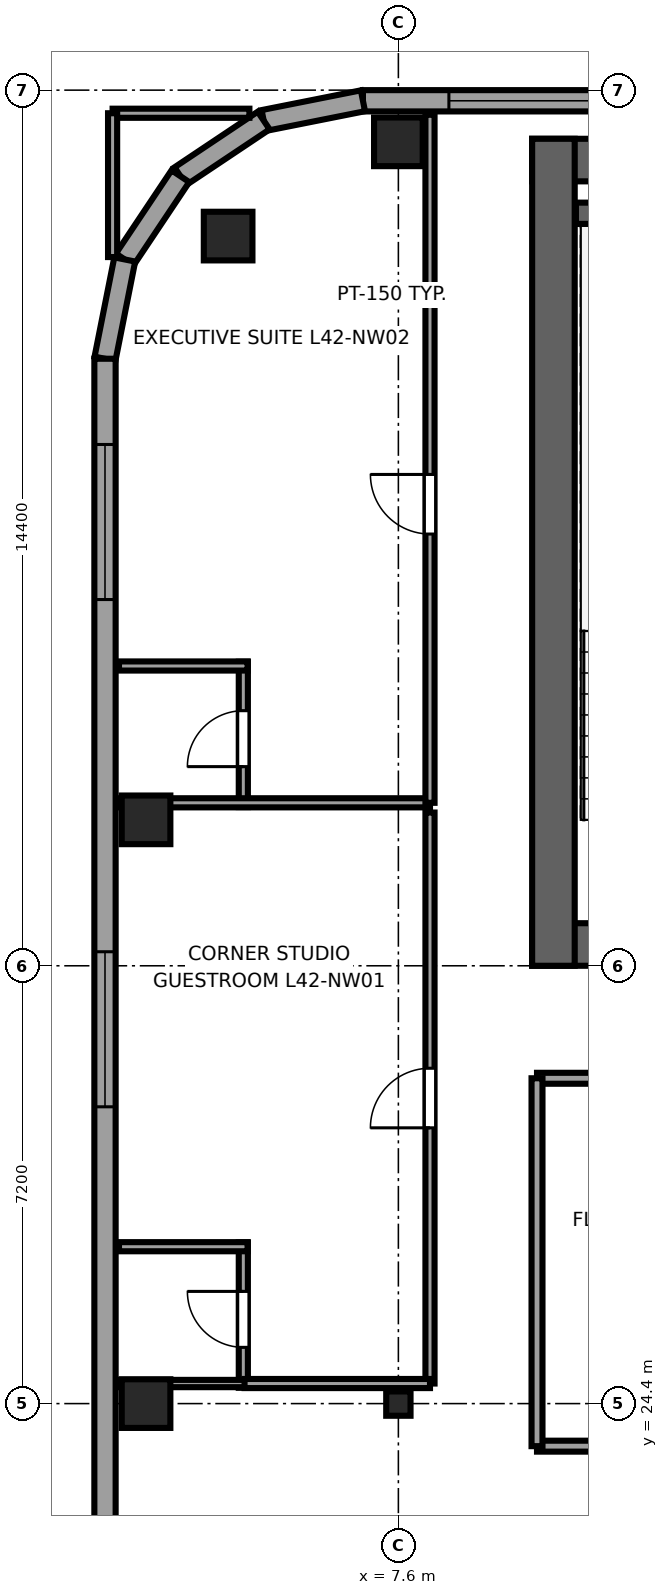
"""IFC4 building model, lengths in metres.
Left out: names, types, materials, properties, quantities, classifications, styles, units other than length and angle.
Written with IfcOpenShell. Run it as: python <this file> out.ifc"""

import sys

from ifc_helpers import new_model, si_unit, direction, frame, frame_2d, origin, origin_2d, place, context, subcontext, project, spatial, rectangle, i_section, extrude, source, transform, mapped, element, fill, save


model = new_model("IFC4")
c1 = context("Model", 3, precision=1e-05, world=origin(), true_north=direction((0.0, 1.0)))
c2 = subcontext(c1, "Body", "Model", "MODEL_VIEW")
j1 = project(units=[si_unit("LENGTHUNIT", "METRE"), si_unit("PLANEANGLEUNIT", "RADIAN")], contexts=[c1])
p1 = place(None, origin())
s1 = spatial("IfcSite", under=j1, at=p1, CompositionType="ELEMENT")
p2 = place(p1, origin())
s2 = spatial("IfcBuilding", under=s1, at=p2, CompositionType="ELEMENT")
p3 = place(p2, frame((0.0, 0.0, 161.25)))
s3 = spatial("IfcBuildingStorey", under=s2, at=p3, CompositionType="ELEMENT", Elevation=161.25)
p4 = place(p3, frame((9.8, 31.95, 0.0), z_axis=(0.0, 0.0, 1.0), x_axis=(1.0, 0.0, 0.0)))
e1 = element("IfcWall", 1, at=p4, inside=s3, PredefinedType="SHEAR", context=c2, shape_type="SweptSolid", body=[
    extrude(rectangle(XDim=26.4, YDim=0.7, at=frame_2d((13.2, 0.0))), origin(), (0.0, 0.0, 1.0), 3.55),
])
p5 = place(p4, frame((7.65, 0.0, 0.0), z_axis=(0.0, 0.0, 1.0), x_axis=(-1.0, 0.0, 0.0)))
e2 = element("IfcOpeningElement", 2, at=p5, cuts=e1, PredefinedType="OPENING", context=c2, shape_type="SweptSolid", body=[
    extrude(rectangle(XDim=1.5, YDim=2.04, at=frame_2d((0.75, 1.02))), frame((0.0, 0.36, 0.0), z_axis=(0.0, -1.0, 0.0), x_axis=(1.0, 0.0, 0.0)), (0.0, 0.0, 1.0), 0.72),
])
p6 = place(p4, frame((13.95, 0.0, 0.0), z_axis=(0.0, 0.0, 1.0), x_axis=(-1.0, 0.0, 0.0)))
e3 = element("IfcOpeningElement", 3, at=p6, cuts=e1, PredefinedType="OPENING", context=c2, shape_type="SweptSolid", body=[
    extrude(rectangle(XDim=1.5, YDim=2.04, at=frame_2d((0.75, 1.02))), frame((0.0, 0.36, 0.0), z_axis=(0.0, -1.0, 0.0), x_axis=(1.0, 0.0, 0.0)), (0.0, 0.0, 1.0), 0.72),
])
p7 = place(p4, frame((20.25, 0.0, 0.0), z_axis=(0.0, 0.0, 1.0), x_axis=(-1.0, 0.0, 0.0)))
e4 = element("IfcOpeningElement", 4, at=p7, cuts=e1, PredefinedType="OPENING", context=c2, shape_type="SweptSolid", body=[
    extrude(rectangle(XDim=1.5, YDim=2.04, at=frame_2d((0.75, 1.02))), frame((0.0, 0.36, 0.0), z_axis=(0.0, -1.0, 0.0), x_axis=(1.0, 0.0, 0.0)), (0.0, 0.0, 1.0), 0.72),
])
p8 = place(p3, frame((9.8, 44.85, 0.0), z_axis=(0.0, 0.0, 1.0), x_axis=(1.0, 0.0, 0.0)))
e5 = element("IfcWall", 5, at=p8, inside=s3, PredefinedType="SHEAR", context=c2, shape_type="SweptSolid", body=[
    extrude(rectangle(XDim=26.4, YDim=0.7, at=frame_2d((13.2, 0.0))), origin(), (0.0, 0.0, 1.0), 3.55),
])
p9 = place(p3, frame((10.15, 31.6, 0.0), z_axis=(0.0, 0.0, 1.0), x_axis=(0.0, 1.0, 0.0)))
e6 = element("IfcWall", 6, at=p9, inside=s3, PredefinedType="SHEAR", context=c2, shape_type="SweptSolid", body=[
    extrude(rectangle(XDim=13.6, YDim=0.7, at=frame_2d((6.8, 0.0))), origin(), (0.0, 0.0, 1.0), 3.55),
])
p10 = place(p3, frame((10.52, 43.975, 0.0), z_axis=(0.0, 0.0, 1.0), x_axis=(1.0, 0.0, 0.0)))
e7 = element("IfcWall", 7, at=p10, inside=s3, PredefinedType="SHEAR", context=c2, shape_type="SweptSolid", body=[
    extrude(rectangle(XDim=3.6, YDim=0.35, at=frame_2d((1.8, 0.0))), origin(), (0.0, 0.0, 1.0), 3.55),
])
m1 = source(origin(), c2, "Body", "SweptSolid", [
    extrude(rectangle(XDim=0.8, YDim=0.8, at=origin_2d()), origin(), (0.0, 0.0, 1.0), 3.55),
])
p11 = place(p3, frame((3.45, 24.4, 0.0), z_axis=(0.0, 0.0, 1.0), x_axis=(1.0, 0.0, 0.0)))
e8 = element("IfcColumn", 8, at=p11, inside=s3, PredefinedType="COLUMN", context=c2, shape_type="MappedRepresentation", body=[
    mapped(m1, transform((0.0, 0.0, 0.0), x_axis=(1.0, 0.0, 0.0), y_axis=(0.0, 1.0, 0.0), z_axis=(0.0, 0.0, 1.0), scale=1.0)),
])
m2 = source(origin(), c2, "Body", "SweptSolid", [
    extrude(i_section(OverallWidth=0.4, OverallDepth=0.4, WebThickness=0.02, FlangeThickness=0.035, at=origin_2d()), origin(), (0.0, 0.0, 1.0), 3.55),
])
p12 = place(p3, frame((7.6, 24.4, 0.0), z_axis=(0.0, 0.0, 1.0), x_axis=(1.0, 0.0, 0.0)))
e9 = element("IfcColumn", 9, at=p12, inside=s3, PredefinedType="COLUMN", context=c2, shape_type="MappedRepresentation", body=[
    mapped(m2, transform((0.0, 0.0, 0.0), x_axis=(1.0, 0.0, 0.0), y_axis=(0.0, 1.0, 0.0), z_axis=(0.0, 0.0, 1.0), scale=1.0)),
])
for number, where, z_axis, x_axis in (
    (10, (4.8, 43.6, 0.0), (0.0, 0.0, 1.0), (1.0, 0.0, 0.0)),
    (11, (7.6, 45.15, 0.0), (0.0, 0.0, 1.0), (1.0, 0.0, 0.0)),
    (12, (3.45, 34.0, 0.0), (0.0, 0.0, 1.0), (1.0, 0.0, 0.0)),
):
    element("IfcColumn", number, at=place(p3, frame(where, z_axis=z_axis, x_axis=x_axis)), inside=s3, PredefinedType="COLUMN", context=c2, shape_type="MappedRepresentation", body=[
        mapped(m1, transform((0.0, 0.0, 0.0), x_axis=(1.0, 0.0, 0.0), y_axis=(0.0, 1.0, 0.0), z_axis=(0.0, 0.0, 1.0), scale=1.0)),
    ])
p13 = place(p3, frame((49.983, 45.825, 0.0), z_axis=(0.0, 0.0, 1.0), x_axis=(-1.0, 0.0, 0.0)))
e13 = element("IfcWall", 13, at=p13, inside=s3, PredefinedType="SOLIDWALL", context=c2, shape_type="SweptSolid", body=[
    extrude(rectangle(XDim=42.966, YDim=0.35, at=frame_2d((21.483, 0.0))), origin(), (0.0, 0.0, 1.0), 3.37),
])
p14 = place(p13, frame((1.413, 0.0, 0.68)))
e14 = element("IfcOpeningElement", 14, at=p14, cuts=e13, PredefinedType="OPENING", context=c2, shape_type="SweptSolid", body=[
    extrude(rectangle(XDim=2.55, YDim=1.92, at=frame_2d((1.275, 0.96))), frame((0.0, 0.185, 0.0), z_axis=(0.0, -1.0, 0.0), x_axis=(1.0, 0.0, 0.0)), (0.0, 0.0, 1.0), 0.37),
])
p15 = place(p13, frame((9.766, 0.0, 0.68)))
e15 = element("IfcOpeningElement", 15, at=p15, cuts=e13, PredefinedType="OPENING", context=c2, shape_type="SweptSolid", body=[
    extrude(rectangle(XDim=2.55, YDim=1.92, at=frame_2d((1.275, 0.96))), frame((0.0, 0.185, 0.0), z_axis=(0.0, -1.0, 0.0), x_axis=(1.0, 0.0, 0.0)), (0.0, 0.0, 1.0), 0.37),
])
p16 = place(p13, frame((13.943, 0.0, 0.68)))
e16 = element("IfcOpeningElement", 16, at=p16, cuts=e13, PredefinedType="OPENING", context=c2, shape_type="SweptSolid", body=[
    extrude(rectangle(XDim=2.55, YDim=1.92, at=frame_2d((1.275, 0.96))), frame((0.0, 0.185, 0.0), z_axis=(0.0, -1.0, 0.0), x_axis=(1.0, 0.0, 0.0)), (0.0, 0.0, 1.0), 0.37),
])
p17 = place(p13, frame((18.12, 0.0, 0.68)))
e17 = element("IfcOpeningElement", 17, at=p17, cuts=e13, PredefinedType="OPENING", context=c2, shape_type="SweptSolid", body=[
    extrude(rectangle(XDim=2.55, YDim=1.92, at=frame_2d((1.275, 0.96))), frame((0.0, 0.185, 0.0), z_axis=(0.0, -1.0, 0.0), x_axis=(1.0, 0.0, 0.0)), (0.0, 0.0, 1.0), 0.37),
])
p18 = place(p13, frame((22.296, 0.0, 0.68)))
e18 = element("IfcOpeningElement", 18, at=p18, cuts=e13, PredefinedType="OPENING", context=c2, shape_type="SweptSolid", body=[
    extrude(rectangle(XDim=2.55, YDim=1.92, at=frame_2d((1.275, 0.96))), frame((0.0, 0.185, 0.0), z_axis=(0.0, -1.0, 0.0), x_axis=(1.0, 0.0, 0.0)), (0.0, 0.0, 1.0), 0.37),
])
p19 = place(p13, frame((26.473, 0.0, 0.68)))
e19 = element("IfcOpeningElement", 19, at=p19, cuts=e13, PredefinedType="OPENING", context=c2, shape_type="SweptSolid", body=[
    extrude(rectangle(XDim=2.55, YDim=1.92, at=frame_2d((1.275, 0.96))), frame((0.0, 0.185, 0.0), z_axis=(0.0, -1.0, 0.0), x_axis=(1.0, 0.0, 0.0)), (0.0, 0.0, 1.0), 0.37),
])
p20 = place(p13, frame((30.649, 0.0, 0.68)))
e20 = element("IfcOpeningElement", 20, at=p20, cuts=e13, PredefinedType="OPENING", context=c2, shape_type="SweptSolid", body=[
    extrude(rectangle(XDim=2.55, YDim=1.92, at=frame_2d((1.275, 0.96))), frame((0.0, 0.185, 0.0), z_axis=(0.0, -1.0, 0.0), x_axis=(1.0, 0.0, 0.0)), (0.0, 0.0, 1.0), 0.37),
])
p21 = place(p13, frame((34.826, 0.0, 0.68)))
e21 = element("IfcOpeningElement", 21, at=p21, cuts=e13, PredefinedType="OPENING", context=c2, shape_type="SweptSolid", body=[
    extrude(rectangle(XDim=2.55, YDim=1.92, at=frame_2d((1.275, 0.96))), frame((0.0, 0.185, 0.0), z_axis=(0.0, -1.0, 0.0), x_axis=(1.0, 0.0, 0.0)), (0.0, 0.0, 1.0), 0.37),
])
p22 = place(p13, frame((39.002, 0.0, 0.68)))
e22 = element("IfcOpeningElement", 22, at=p22, cuts=e13, PredefinedType="OPENING", context=c2, shape_type="SweptSolid", body=[
    extrude(rectangle(XDim=2.55, YDim=1.92, at=frame_2d((1.275, 0.96))), frame((0.0, 0.185, 0.0), z_axis=(0.0, -1.0, 0.0), x_axis=(1.0, 0.0, 0.0)), (0.0, 0.0, 1.0), 0.37),
])
p23 = place(p3, frame((7.017, 45.825, 0.0), z_axis=(0.0, 0.0, 1.0), x_axis=(-0.980788844421, -0.195072403631, 0.0)))
e23 = element("IfcWall", 23, at=p23, inside=s3, PredefinedType="SOLIDWALL", context=c2, shape_type="SweptSolid", body=[
    extrude(rectangle(XDim=1.665, YDim=0.35, at=frame_2d((0.832, 0.0))), origin(), (0.0, 0.0, 1.0), 3.37),
])
for number, where, z_axis, x_axis in (
    (24, (5.385, 45.5, 0.0), (0.0, 0.0, 1.0), (-0.832, -0.556, 0.0)),
    (25, (4.015, 44.585, 0.0), (0.0, 0.0, 1.0), (-0.556, -0.831, 0.0)),
):
    element("IfcWall", number, at=place(p3, frame(where, z_axis=z_axis, x_axis=x_axis)), inside=s3, PredefinedType="SOLIDWALL", context=c2, shape_type="SweptSolid", body=[
        extrude(rectangle(XDim=1.647, YDim=0.35, at=frame_2d((0.824, 0.0))), origin(), (0.0, 0.0, 1.0), 2.832),
    ])
p24 = place(p3, frame((3.1, 43.216, 0.0), z_axis=(0.0, 0.0, 1.0), x_axis=(-0.195044345786, -0.980794424524, 0.0)))
e26 = element("IfcWall", 26, at=p24, inside=s3, PredefinedType="SOLIDWALL", context=c2, shape_type="SweptSolid", body=[
    extrude(rectangle(XDim=1.665, YDim=0.35, at=frame_2d((0.833, 0.0))), origin(), (0.0, 0.0, 1.0), 3.37),
])
p25 = place(p3, frame((2.775, 41.583, 0.0), z_axis=(0.0, 0.0, 1.0), x_axis=(0.0, -1.0, 0.0)))
e27 = element("IfcWall", 27, at=p25, inside=s3, PredefinedType="SOLIDWALL", context=c2, shape_type="SweptSolid", body=[
    extrude(rectangle(XDim=34.566, YDim=0.35, at=frame_2d((17.283, 0.0))), origin(), (0.0, 0.0, 1.0), 3.37),
])
p26 = place(p25, frame((1.41, 0.0, 0.68)))
e28 = element("IfcOpeningElement", 28, at=p26, cuts=e27, PredefinedType="OPENING", context=c2, shape_type="SweptSolid", body=[
    extrude(rectangle(XDim=2.55, YDim=1.92, at=frame_2d((1.275, 0.96))), frame((0.0, 0.185, 0.0), z_axis=(0.0, -1.0, 0.0), x_axis=(1.0, 0.0, 0.0)), (0.0, 0.0, 1.0), 0.37),
])
p27 = place(p25, frame((9.752, 0.0, 0.68)))
e29 = element("IfcOpeningElement", 29, at=p27, cuts=e27, PredefinedType="OPENING", context=c2, shape_type="SweptSolid", body=[
    extrude(rectangle(XDim=2.55, YDim=1.92, at=frame_2d((1.275, 0.96))), frame((0.0, 0.185, 0.0), z_axis=(0.0, -1.0, 0.0), x_axis=(1.0, 0.0, 0.0)), (0.0, 0.0, 1.0), 0.37),
])
p28 = place(p25, frame((32.079, 0.0, 0.62)))
e30 = element("IfcOpeningElement", 30, at=p28, cuts=e27, PredefinedType="OPENING", context=c2, shape_type="SweptSolid", body=[
    extrude(rectangle(XDim=1.5, YDim=1.55, at=frame_2d((0.75, 0.775))), frame((0.0, 0.185, 0.0), z_axis=(0.0, -1.0, 0.0), x_axis=(1.0, 0.0, 0.0)), (0.0, 0.0, 1.0), 0.37),
])
p29 = place(p25, frame((28.583, 0.0, 0.62)))
e31 = element("IfcOpeningElement", 31, at=p29, cuts=e27, PredefinedType="OPENING", context=c2, shape_type="SweptSolid", body=[
    extrude(rectangle(XDim=1.5, YDim=1.55, at=frame_2d((0.75, 0.775))), frame((0.0, 0.185, 0.0), z_axis=(0.0, -1.0, 0.0), x_axis=(1.0, 0.0, 0.0)), (0.0, 0.0, 1.0), 0.37),
])
p30 = place(p25, frame((24.883, 0.0, 0.62)))
e32 = element("IfcOpeningElement", 32, at=p30, cuts=e27, PredefinedType="OPENING", context=c2, shape_type="SweptSolid", body=[
    extrude(rectangle(XDim=1.5, YDim=1.55, at=frame_2d((0.75, 0.775))), frame((0.0, 0.185, 0.0), z_axis=(0.0, -1.0, 0.0), x_axis=(1.0, 0.0, 0.0)), (0.0, 0.0, 1.0), 0.37),
])
p31 = place(p25, frame((21.183, 0.0, 0.62)))
e33 = element("IfcOpeningElement", 33, at=p31, cuts=e27, PredefinedType="OPENING", context=c2, shape_type="SweptSolid", body=[
    extrude(rectangle(XDim=1.5, YDim=1.55, at=frame_2d((0.75, 0.775))), frame((0.0, 0.185, 0.0), z_axis=(0.0, -1.0, 0.0), x_axis=(1.0, 0.0, 0.0)), (0.0, 0.0, 1.0), 0.37),
])
p32 = place(p3, frame((5.05, 24.66, 0.0), z_axis=(0.0, 0.0, 1.0), x_axis=(0.0, 1.0, 0.0)))
e34 = element("IfcWall", 34, at=p32, inside=s3, PredefinedType="PARTITIONING", context=c2, shape_type="SweptSolid", body=[
    extrude(rectangle(XDim=2.39, YDim=0.15, at=frame_2d((1.195, 0.0))), origin(), (0.0, 0.0, 1.0), 3.37),
])
p33 = place(p32, frame((0.665, 0.0, 0.0)))
e35 = element("IfcOpeningElement", 35, at=p33, cuts=e34, PredefinedType="OPENING", context=c2, shape_type="SweptSolid", body=[
    extrude(rectangle(XDim=0.92, YDim=2.01, at=frame_2d((0.46, 1.005))), frame((0.0, 0.085, 0.0), z_axis=(0.0, -1.0, 0.0), x_axis=(1.0, 0.0, 0.0)), (0.0, 0.0, 1.0), 0.17),
])
p34 = place(p3, frame((3.005, 24.73, 0.0), z_axis=(0.0, 0.0, 1.0), x_axis=(1.0, 0.0, 0.0)))
e36 = element("IfcWall", 36, at=p34, inside=s3, PredefinedType="PLUMBINGWALL", context=c2, shape_type="SweptSolid", body=[
    extrude(rectangle(XDim=2.115, YDim=0.12, at=frame_2d((1.058, 0.0))), origin(), (0.0, 0.0, 1.0), 3.37),
])
p35 = place(p3, frame((3.005, 26.98, 0.0), z_axis=(0.0, 0.0, 1.0), x_axis=(1.0, 0.0, 0.0)))
e37 = element("IfcWall", 37, at=p35, inside=s3, PredefinedType="PARTITIONING", context=c2, shape_type="SweptSolid", body=[
    extrude(rectangle(XDim=2.115, YDim=0.15, at=frame_2d((1.058, 0.0))), origin(), (0.0, 0.0, 1.0), 3.37),
])
p36 = place(p3, frame((5.05, 34.21, 0.0), z_axis=(0.0, 0.0, 1.0), x_axis=(0.0, 1.0, 0.0)))
e38 = element("IfcWall", 38, at=p36, inside=s3, PredefinedType="PARTITIONING", context=c2, shape_type="SweptSolid", body=[
    extrude(rectangle(XDim=2.39, YDim=0.15, at=frame_2d((1.195, 0.0))), origin(), (0.0, 0.0, 1.0), 3.37),
])
p37 = place(p36, frame((0.665, 0.0, 0.0)))
e39 = element("IfcOpeningElement", 39, at=p37, cuts=e38, PredefinedType="OPENING", context=c2, shape_type="SweptSolid", body=[
    extrude(rectangle(XDim=0.92, YDim=2.01, at=frame_2d((0.46, 1.005))), frame((0.0, 0.085, 0.0), z_axis=(0.0, -1.0, 0.0), x_axis=(1.0, 0.0, 0.0)), (0.0, 0.0, 1.0), 0.17),
])
p38 = place(p3, frame((3.005, 34.28, 0.0), z_axis=(0.0, 0.0, 1.0), x_axis=(1.0, 0.0, 0.0)))
e40 = element("IfcWall", 40, at=p38, inside=s3, PredefinedType="PARTITIONING", context=c2, shape_type="SweptSolid", body=[
    extrude(rectangle(XDim=5.115, YDim=0.15, at=frame_2d((2.558, 0.0))), origin(), (0.0, 0.0, 1.0), 2.16),
])
p39 = place(p3, frame((3.005, 36.53, 0.0), z_axis=(0.0, 0.0, 1.0), x_axis=(1.0, 0.0, 0.0)))
e41 = element("IfcWall", 41, at=p39, inside=s3, PredefinedType="PARTITIONING", context=c2, shape_type="SweptSolid", body=[
    extrude(rectangle(XDim=2.115, YDim=0.15, at=frame_2d((1.058, 0.0))), origin(), (0.0, 0.0, 1.0), 3.37),
])
p40 = place(p3, frame((8.12, 24.73, 0.0), z_axis=(0.0, 0.0, 1.0), x_axis=(0.0, 1.0, 0.0)))
e42 = element("IfcWall", 42, at=p40, inside=s3, PredefinedType="PARTITIONING", context=c2, shape_type="SweptSolid", body=[
    extrude(rectangle(XDim=9.39, YDim=0.15, at=frame_2d((4.695, 0.0))), origin(), (0.0, 0.0, 1.0), 3.37),
])
p41 = place(p40, frame((4.205, 0.0, 0.0)))
e43 = element("IfcOpeningElement", 43, at=p41, cuts=e42, PredefinedType="OPENING", context=c2, shape_type="SweptSolid", body=[
    extrude(rectangle(XDim=0.98, YDim=2.12, at=frame_2d((0.49, 1.06))), frame((0.0, 0.085, 0.0), z_axis=(0.0, -1.0, 0.0), x_axis=(1.0, 0.0, 0.0)), (0.0, 0.0, 1.0), 0.17),
])
p42 = place(p3, frame((5.07, 24.73, 0.0), z_axis=(0.0, 0.0, 1.0), x_axis=(1.0, 0.0, 0.0)))
e44 = element("IfcWall", 44, at=p42, inside=s3, PredefinedType="PARTITIONING", context=c2, shape_type="SweptSolid", body=[
    extrude(rectangle(XDim=3.05, YDim=0.15, at=frame_2d((1.525, 0.0))), origin(), (0.0, 0.0, 1.0), 3.37),
])
p43 = place(p3, frame((8.12, 34.28, 0.0), z_axis=(0.0, 0.0, 1.0), x_axis=(0.0, 1.0, 0.0)))
e45 = element("IfcWall", 45, at=p43, inside=s3, PredefinedType="PARTITIONING", context=c2, shape_type="SweptSolid", body=[
    extrude(rectangle(XDim=11.315, YDim=0.15, at=frame_2d((5.657, 0.0))), origin(), (0.0, 0.0, 1.0), 3.37),
])
p44 = place(p43, frame((4.42, 0.0, 0.0)))
e46 = element("IfcOpeningElement", 46, at=p44, cuts=e45, PredefinedType="OPENING", context=c2, shape_type="SweptSolid", body=[
    extrude(rectangle(XDim=0.98, YDim=2.12, at=frame_2d((0.49, 1.06))), frame((0.0, 0.085, 0.0), z_axis=(0.0, -1.0, 0.0), x_axis=(1.0, 0.0, 0.0)), (0.0, 0.0, 1.0), 0.17),
])
p45 = place(p3, frame((2.9, 45.62, 0.0), z_axis=(0.0, 0.0, 1.0), x_axis=(1.0, 0.0, 0.0)))
e47 = element("IfcWall", 47, at=p45, inside=s3, PredefinedType="PARTITIONING", context=c2, shape_type="SweptSolid", body=[
    extrude(rectangle(XDim=2.25, YDim=0.15, at=frame_2d((1.125, 0.0))), origin(), (0.0, 0.0, 1.0), 3.37),
])
p46 = place(p3, frame((2.9, 43.255, 0.0), z_axis=(0.0, 0.0, 1.0), x_axis=(0.0, 1.0, 0.0)))
e48 = element("IfcWall", 48, at=p46, inside=s3, PredefinedType="PARTITIONING", context=c2, shape_type="SweptSolid", body=[
    extrude(rectangle(XDim=2.365, YDim=0.15, at=frame_2d((1.183, 0.0))), origin(), (0.0, 0.0, 1.0), 3.37),
])
p47 = place(p3, frame((9.88, 23.7, 0.0), z_axis=(0.0, 0.0, 1.0), x_axis=(1.0, 0.0, 0.0)))
e49 = element("IfcWall", 49, at=p47, inside=s3, PredefinedType="PARTITIONING", context=c2, shape_type="SweptSolid", body=[
    extrude(rectangle(XDim=4.22, YDim=0.18, at=frame_2d((2.11, 0.0))), origin(), (0.0, 0.0, 1.0), 3.37),
])
p48 = place(p47, frame((1.285, 0.0, 0.0)))
e50 = element("IfcOpeningElement", 50, at=p48, cuts=e49, PredefinedType="OPENING", context=c2, shape_type="SweptSolid", body=[
    extrude(rectangle(XDim=1.65, YDim=2.15, at=frame_2d((0.825, 1.075))), frame((0.0, 0.1, 0.0), z_axis=(0.0, -1.0, 0.0), x_axis=(1.0, 0.0, 0.0)), (0.0, 0.0, 1.0), 0.2),
])
p49 = place(p3, frame((9.88, 29.75, 0.0), z_axis=(0.0, 0.0, 1.0), x_axis=(1.0, 0.0, 0.0)))
e51 = element("IfcWall", 51, at=p49, inside=s3, PredefinedType="PARTITIONING", context=c2, shape_type="SweptSolid", body=[
    extrude(rectangle(XDim=4.22, YDim=0.18, at=frame_2d((2.11, 0.0))), origin(), (0.0, 0.0, 1.0), 3.37),
])
p50 = place(p3, frame((9.88, 23.7, 0.0), z_axis=(0.0, 0.0, 1.0), x_axis=(0.0, 1.0, 0.0)))
e52 = element("IfcWall", 52, at=p50, inside=s3, PredefinedType="PARTITIONING", context=c2, shape_type="SweptSolid", body=[
    extrude(rectangle(XDim=6.05, YDim=0.18, at=frame_2d((3.025, 0.0))), origin(), (0.0, 0.0, 1.0), 3.37),
])
m3 = source(origin(), c2, "Body", "SweptSolid", [
    extrude(rectangle(XDim=2.55, YDim=1.92, at=frame_2d((1.275, 0.96))), frame((0.0, 0.09, 0.0), z_axis=(0.0, -1.0, 0.0), x_axis=(1.0, 0.0, 0.0)), (0.0, 0.0, 1.0), 0.06),
])
p51 = place(p22, origin())
e53 = element("IfcWindow", 53, at=p51, inside=s3, PartitioningType="TRIPLE_PANEL_HORIZONTAL", PredefinedType="WINDOW", context=c2, shape_type="MappedRepresentation", body=[
    mapped(m3, transform((0.0, 0.0, 0.0), x_axis=(1.0, 0.0, 0.0), y_axis=(0.0, 1.0, 0.0), z_axis=(0.0, 0.0, 1.0), scale=1.0)),
])
fill(e22, e53)
p52 = place(p26, origin())
e54 = element("IfcWindow", 54, at=p52, inside=s3, PartitioningType="TRIPLE_PANEL_HORIZONTAL", PredefinedType="WINDOW", context=c2, shape_type="MappedRepresentation", body=[
    mapped(m3, transform((0.0, 0.0, 0.0), x_axis=(1.0, 0.0, 0.0), y_axis=(0.0, 1.0, 0.0), z_axis=(0.0, 0.0, 1.0), scale=1.0)),
])
fill(e28, e54)
p53 = place(p27, origin())
e55 = element("IfcWindow", 55, at=p53, inside=s3, PartitioningType="TRIPLE_PANEL_HORIZONTAL", PredefinedType="WINDOW", context=c2, shape_type="MappedRepresentation", body=[
    mapped(m3, transform((0.0, 0.0, 0.0), x_axis=(1.0, 0.0, 0.0), y_axis=(0.0, 1.0, 0.0), z_axis=(0.0, 0.0, 1.0), scale=1.0)),
])
fill(e29, e55)
m4 = source(origin(), c2, "Body", "SweptSolid", [
    extrude(rectangle(XDim=0.92, YDim=2.01, at=frame_2d((0.46, 1.005))), frame((0.0, 0.025, 0.0), z_axis=(0.0, -1.0, 0.0), x_axis=(1.0, 0.0, 0.0)), (0.0, 0.0, 1.0), 0.05),
])
p54 = place(p33, origin())
e56 = element("IfcDoor", 56, at=p54, inside=s3, OperationType="SINGLE_SWING_RIGHT", PredefinedType="DOOR", context=c2, shape_type="MappedRepresentation", body=[
    mapped(m4, transform((0.0, 0.0, 0.0), x_axis=(1.0, 0.0, 0.0), y_axis=(0.0, 1.0, 0.0), z_axis=(0.0, 0.0, 1.0), scale=1.0)),
])
fill(e35, e56)
p55 = place(p37, origin())
e57 = element("IfcDoor", 57, at=p55, inside=s3, OperationType="SINGLE_SWING_LEFT", PredefinedType="DOOR", context=c2, shape_type="MappedRepresentation", body=[
    mapped(m4, transform((0.0, 0.0, 0.0), x_axis=(1.0, 0.0, 0.0), y_axis=(0.0, 1.0, 0.0), z_axis=(0.0, 0.0, 1.0), scale=1.0)),
])
fill(e39, e57)
m5 = source(origin(), c2, "Body", "SweptSolid", [
    extrude(rectangle(XDim=0.98, YDim=2.12, at=frame_2d((0.49, 1.06))), frame((0.0, 0.025, 0.0), z_axis=(0.0, -1.0, 0.0), x_axis=(1.0, 0.0, 0.0)), (0.0, 0.0, 1.0), 0.05),
])
p56 = place(p41, origin())
e58 = element("IfcDoor", 58, at=p56, inside=s3, OperationType="SINGLE_SWING_LEFT", PredefinedType="DOOR", context=c2, shape_type="MappedRepresentation", body=[
    mapped(m5, transform((0.0, 0.0, 0.0), x_axis=(1.0, 0.0, 0.0), y_axis=(0.0, 1.0, 0.0), z_axis=(0.0, 0.0, 1.0), scale=1.0)),
])
fill(e43, e58)
p57 = place(p44, origin())
e59 = element("IfcDoor", 59, at=p57, inside=s3, OperationType="SINGLE_SWING_RIGHT", PredefinedType="DOOR", context=c2, shape_type="MappedRepresentation", body=[
    mapped(m5, transform((0.0, 0.0, 0.0), x_axis=(1.0, 0.0, 0.0), y_axis=(0.0, 1.0, 0.0), z_axis=(0.0, 0.0, 1.0), scale=1.0)),
])
fill(e46, e59)
save(model, sys.argv[1])
